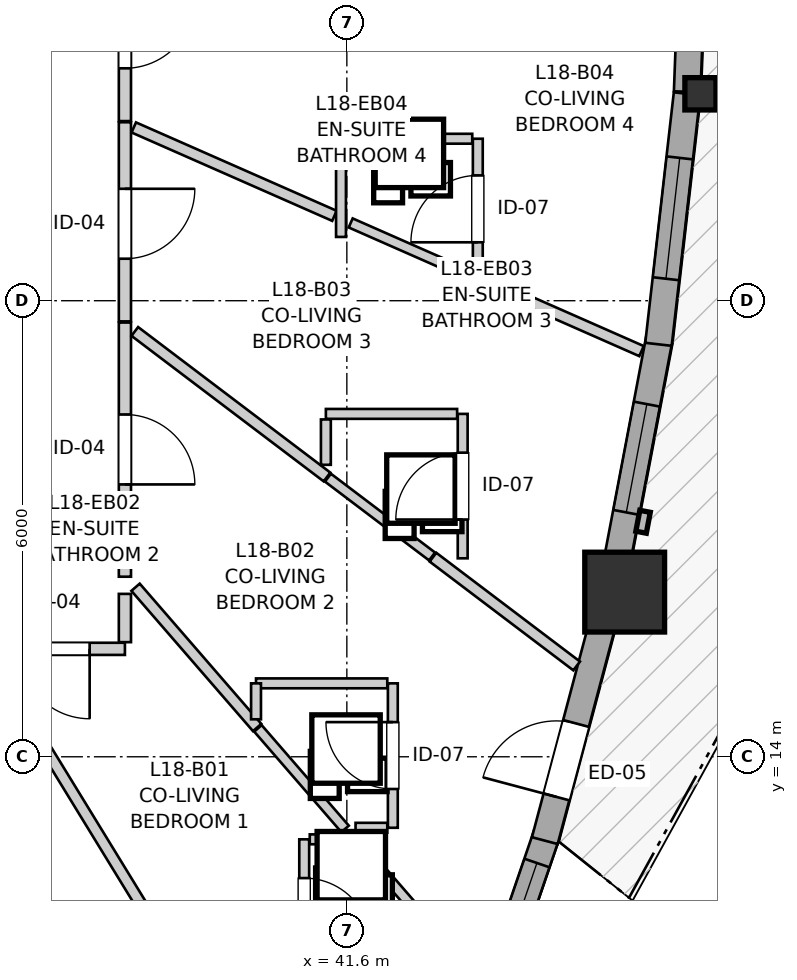
"""IFC4 building model, lengths in metres.
Left out: names, types, materials, properties, quantities, classifications, styles, units other than length and angle.
Written with IfcOpenShell. Run it as: python <this file> out.ifc"""

import sys

from ifc_helpers import new_model, si_unit, direction, frame, frame_2d, origin, origin_2d, place, context, subcontext, project, spatial, rectangle, i_section, extrude, source, transform, mapped, element, fill, save


model = new_model("IFC4")
c1 = context("Model", 3, precision=1e-05, world=origin(), true_north=direction((0.0, 1.0)))
c2 = subcontext(c1, "Body", "Model", "MODEL_VIEW")
j1 = project(units=[si_unit("LENGTHUNIT", "METRE"), si_unit("PLANEANGLEUNIT", "RADIAN")], contexts=[c1])
p1 = place(None, origin())
s1 = spatial("IfcSite", under=j1, at=p1, CompositionType="ELEMENT")
p2 = place(p1, origin())
s2 = spatial("IfcBuilding", under=s1, at=p2, CompositionType="ELEMENT")
p3 = place(p2, frame((0.0, 0.0, 62.2)))
s3 = spatial("IfcBuildingStorey", under=s2, at=p3, CompositionType="ELEMENT", Elevation=62.2)
m1 = source(origin(), c2, "Body", "SweptSolid", [
    extrude(rectangle(XDim=1.05, YDim=1.05, at=origin_2d()), origin(), (0.0, 0.0, 1.0), 2.9),
])
p4 = place(p3, frame((45.256, 16.166, 0.0), z_axis=(0.0, 0.0, 1.0), x_axis=(1.0, 0.0, 0.0)))
e1 = element("IfcColumn", 1, at=p4, inside=s3, PredefinedType="COLUMN", context=c2, shape_type="MappedRepresentation", body=[
    mapped(m1, transform((0.0, 0.0, 0.0), x_axis=(1.0, 0.0, 0.0), y_axis=(0.0, 1.0, 0.0), z_axis=(0.0, 0.0, 1.0), scale=1.0)),
])
m2 = source(origin(), c2, "Body", "SweptSolid", [
    extrude(i_section(OverallWidth=0.409, OverallDepth=0.425, WebThickness=0.03, FlangeThickness=0.048, FilletRadius=0.015, at=origin_2d()), origin(), (0.0, 0.0, 1.0), 2.9),
])
p5 = place(p3, frame((46.252, 22.722, 0.0), z_axis=(0.0, 0.0, 1.0), x_axis=(1.0, 0.0, 0.0)))
e2 = element("IfcColumn", 2, at=p5, inside=s3, PredefinedType="PILASTER", context=c2, shape_type="MappedRepresentation", body=[
    mapped(m2, transform((0.0, 0.0, 0.0), x_axis=(1.0, 0.0, 0.0), y_axis=(0.0, 1.0, 0.0), z_axis=(0.0, 0.0, 1.0), scale=1.0)),
])
p6 = place(p3, frame((43.104, 9.686, 0.0), z_axis=(0.0, 0.0, 1.0), x_axis=(0.323558843572, 0.946208050455, 0.0)))
e3 = element("IfcWall", 3, at=p6, inside=s3, PredefinedType="SOLIDWALL", context=c2, shape_type="SweptSolid", body=[
    extrude(rectangle(XDim=3.482, YDim=0.35, at=frame_2d((1.741, 0.0))), origin(), (0.0, 0.0, 1.0), 2.38),
])
p7 = place(p6, frame((0.396, 0.0, 0.82)))
e4 = element("IfcOpeningElement", 4, at=p7, cuts=e3, PredefinedType="OPENING", context=c2, shape_type="SweptSolid", body=[
    extrude(rectangle(XDim=0.58, YDim=1.35, at=frame_2d((0.29, 0.675))), frame((0.0, 0.185, 0.0), z_axis=(0.0, -1.0, 0.0), x_axis=(1.0, 0.0, 0.0)), (0.0, 0.0, 1.0), 0.37),
])
p8 = place(p6, frame((1.632, 0.0, 0.82)))
e5 = element("IfcOpeningElement", 5, at=p8, cuts=e3, PredefinedType="OPENING", context=c2, shape_type="SweptSolid", body=[
    extrude(rectangle(XDim=1.45, YDim=1.25, at=frame_2d((0.725, 0.625))), frame((0.0, 0.185, 0.0), z_axis=(0.0, -1.0, 0.0), x_axis=(1.0, 0.0, 0.0)), (0.0, 0.0, 1.0), 0.37),
])
p9 = place(p3, frame((44.205, 12.897, 0.0), z_axis=(0.0, 0.0, 1.0), x_axis=(0.257099428233, 0.966384956424, 0.0)))
e6 = element("IfcWall", 6, at=p9, inside=s3, PredefinedType="SOLIDWALL", context=c2, shape_type="SweptSolid", body=[
    extrude(rectangle(XDim=3.13, YDim=0.35, at=frame_2d((1.565, 0.0))), origin(), (0.0, 0.0, 1.0), 2.38),
])
p10 = place(p9, frame((0.595, 0.0, 0.0)))
e7 = element("IfcOpeningElement", 7, at=p10, cuts=e6, PredefinedType="OPENING", context=c2, shape_type="SweptSolid", body=[
    extrude(rectangle(XDim=1.0, YDim=2.1, at=frame_2d((0.5, 1.05))), frame((0.0, 0.185, 0.0), z_axis=(0.0, -1.0, 0.0), x_axis=(1.0, 0.0, 0.0)), (0.0, 0.0, 1.0), 0.37),
])
p11 = place(p3, frame((45.14, 16.494, 0.0), z_axis=(0.0, 0.0, 1.0), x_axis=(0.186608529586, 0.982434352354, 0.0)))
e8 = element("IfcWall", 8, at=p11, inside=s3, PredefinedType="SOLIDWALL", context=c2, shape_type="SweptSolid", body=[
    extrude(rectangle(XDim=3.074, YDim=0.35, at=frame_2d((1.537, 0.0))), origin(), (0.0, 0.0, 1.0), 2.38),
])
p12 = place(p11, frame((0.734, 0.0, 0.82)))
e9 = element("IfcOpeningElement", 9, at=p12, cuts=e8, PredefinedType="OPENING", context=c2, shape_type="SweptSolid", body=[
    extrude(rectangle(XDim=1.45, YDim=1.25, at=frame_2d((0.725, 0.625))), frame((0.0, 0.185, 0.0), z_axis=(0.0, -1.0, 0.0), x_axis=(1.0, 0.0, 0.0)), (0.0, 0.0, 1.0), 0.37),
])
p13 = place(p3, frame((45.7, 19.426, 0.0), z_axis=(0.0, 0.0, 1.0), x_axis=(0.113266370988, 0.993564657787, 0.0)))
e10 = element("IfcWall", 10, at=p13, inside=s3, PredefinedType="SOLIDWALL", context=c2, shape_type="SweptSolid", body=[
    extrude(rectangle(XDim=3.317, YDim=0.35, at=frame_2d((1.659, 0.0))), origin(), (0.0, 0.0, 1.0), 2.38),
])
p14 = place(p13, frame((0.869, 0.0, 0.82)))
e11 = element("IfcOpeningElement", 11, at=p14, cuts=e10, PredefinedType="OPENING", context=c2, shape_type="SweptSolid", body=[
    extrude(rectangle(XDim=1.6, YDim=1.35, at=frame_2d((0.8, 0.675))), frame((0.0, 0.185, 0.0), z_axis=(0.0, -1.0, 0.0), x_axis=(1.0, 0.0, 0.0)), (0.0, 0.0, 1.0), 0.37),
])
p15 = place(p3, frame((46.078, 22.749, 0.0), z_axis=(0.0, 0.0, 1.0), x_axis=(0.037972593677, 0.999278780986, 0.0)))
e12 = element("IfcWall", 12, at=p15, inside=s3, PredefinedType="SOLIDWALL", context=c2, shape_type="SweptSolid", body=[
    extrude(rectangle(XDim=3.298, YDim=0.35, at=frame_2d((1.649, 0.0))), origin(), (0.0, 0.0, 1.0), 2.38),
])
p16 = place(p15, frame((1.394, 0.0, 0.82)))
e13 = element("IfcOpeningElement", 13, at=p16, cuts=e12, PredefinedType="OPENING", context=c2, shape_type="SweptSolid", body=[
    extrude(rectangle(XDim=1.25, YDim=1.35, at=frame_2d((0.625, 0.675))), frame((0.0, 0.185, 0.0), z_axis=(0.0, -1.0, 0.0), x_axis=(1.0, 0.0, 0.0)), (0.0, 0.0, 1.0), 0.37),
])
p17 = place(p3, frame((38.68, 19.713, 0.0), z_axis=(0.0, 0.0, 1.0), x_axis=(0.0, -1.0, 0.0)))
e14 = element("IfcWall", 14, at=p17, inside=s3, PredefinedType="PARTITIONING", context=c2, shape_type="SweptSolid", body=[
    extrude(rectangle(XDim=3.344, YDim=0.16, at=frame_2d((1.672, 0.0))), origin(), (0.0, 0.0, 1.0), 2.9),
])
p18 = place(p17, frame((1.21, 0.0, 0.0)))
e15 = element("IfcOpeningElement", 15, at=p18, cuts=e14, PredefinedType="OPENING", context=c2, shape_type="SweptSolid", body=[
    extrude(rectangle(XDim=0.92, YDim=2.1, at=frame_2d((0.46, 1.05))), frame((0.0, 0.09, 0.0), z_axis=(0.0, -1.0, 0.0), x_axis=(1.0, 0.0, 0.0)), (0.0, 0.0, 1.0), 0.18),
])
p19 = place(p3, frame((38.68, 22.348, 0.0), z_axis=(0.0, 0.0, 1.0), x_axis=(0.0, -1.0, 0.0)))
e16 = element("IfcWall", 16, at=p19, inside=s3, PredefinedType="PARTITIONING", context=c2, shape_type="SweptSolid", body=[
    extrude(rectangle(XDim=2.62, YDim=0.16, at=frame_2d((1.31, 0.0))), origin(), (0.0, 0.0, 1.0), 2.9),
])
p20 = place(p19, frame((0.875, 0.0, 0.0)))
e17 = element("IfcOpeningElement", 17, at=p20, cuts=e16, PredefinedType="OPENING", context=c2, shape_type="SweptSolid", body=[
    extrude(rectangle(XDim=0.92, YDim=2.1, at=frame_2d((0.46, 1.05))), frame((0.0, 0.09, 0.0), z_axis=(0.0, -1.0, 0.0), x_axis=(1.0, 0.0, 0.0)), (0.0, 0.0, 1.0), 0.18),
])
p21 = place(p3, frame((38.68, 24.72, 0.0), z_axis=(0.0, 0.0, 1.0), x_axis=(0.0, -1.0, 0.0)))
e18 = element("IfcWall", 18, at=p21, inside=s3, PredefinedType="PARTITIONING", context=c2, shape_type="SweptSolid", body=[
    extrude(rectangle(XDim=2.357, YDim=0.16, at=frame_2d((1.178, 0.0))), origin(), (0.0, 0.0, 1.0), 2.9),
])
p22 = place(p21, frame((0.742, 0.0, 0.0)))
e19 = element("IfcOpeningElement", 19, at=p22, cuts=e18, PredefinedType="OPENING", context=c2, shape_type="SweptSolid", body=[
    extrude(rectangle(XDim=0.92, YDim=2.1, at=frame_2d((0.46, 1.05))), frame((0.0, 0.09, 0.0), z_axis=(0.0, -1.0, 0.0), x_axis=(1.0, 0.0, 0.0)), (0.0, 0.0, 1.0), 0.18),
])
p23 = place(p3, frame((41.039, 12.914, 0.0), z_axis=(0.0, 0.0, 1.0), x_axis=(0.0, -1.0, 0.0)))
e20 = element("IfcWall", 20, at=p23, inside=s3, PredefinedType="PARTITIONING", context=c2, shape_type="SweptSolid", body=[
    extrude(rectangle(XDim=1.9, YDim=0.13, at=frame_2d((0.95, 0.0))), origin(), (0.0, 0.0, 1.0), 2.9),
])
p24 = place(p23, frame((0.51, 0.0, 0.0)))
e21 = element("IfcOpeningElement", 21, at=p24, cuts=e20, PredefinedType="OPENING", context=c2, shape_type="SweptSolid", body=[
    extrude(rectangle(XDim=0.88, YDim=2.05, at=frame_2d((0.44, 1.025))), frame((0.0, 0.075, 0.0), z_axis=(0.0, -1.0, 0.0), x_axis=(1.0, 0.0, 0.0)), (0.0, 0.0, 1.0), 0.15),
])
p25 = place(p3, frame((42.205, 13.066, 0.0), z_axis=(0.0, 0.0, 1.0), x_axis=(0.0, 1.0, 0.0)))
e22 = element("IfcWall", 22, at=p25, inside=s3, PredefinedType="PARTITIONING", context=c2, shape_type="SweptSolid", body=[
    extrude(rectangle(XDim=1.9, YDim=0.13, at=frame_2d((0.95, 0.0))), origin(), (0.0, 0.0, 1.0), 2.9),
])
p26 = place(p25, frame((0.51, 0.0, 0.0)))
e23 = element("IfcOpeningElement", 23, at=p26, cuts=e22, PredefinedType="OPENING", context=c2, shape_type="SweptSolid", body=[
    extrude(rectangle(XDim=0.88, YDim=2.05, at=frame_2d((0.44, 1.025))), frame((0.0, 0.075, 0.0), z_axis=(0.0, -1.0, 0.0), x_axis=(1.0, 0.0, 0.0)), (0.0, 0.0, 1.0), 0.15),
])
p27 = place(p3, frame((43.124, 16.611, 0.0), z_axis=(0.0, 0.0, 1.0), x_axis=(0.0, 1.0, 0.0)))
e24 = element("IfcWall", 24, at=p27, inside=s3, PredefinedType="PARTITIONING", context=c2, shape_type="SweptSolid", body=[
    extrude(rectangle(XDim=1.9, YDim=0.13, at=frame_2d((0.95, 0.0))), origin(), (0.0, 0.0, 1.0), 2.9),
])
p28 = place(p27, frame((0.51, 0.0, 0.0)))
e25 = element("IfcOpeningElement", 25, at=p28, cuts=e24, PredefinedType="OPENING", context=c2, shape_type="SweptSolid", body=[
    extrude(rectangle(XDim=0.88, YDim=2.05, at=frame_2d((0.44, 1.025))), frame((0.0, 0.075, 0.0), z_axis=(0.0, -1.0, 0.0), x_axis=(1.0, 0.0, 0.0)), (0.0, 0.0, 1.0), 0.15),
])
p29 = place(p3, frame((43.323, 20.286, 0.0), z_axis=(0.0, 0.0, 1.0), x_axis=(0.0, 1.0, 0.0)))
e26 = element("IfcWall", 26, at=p29, inside=s3, PredefinedType="PARTITIONING", context=c2, shape_type="SweptSolid", body=[
    extrude(rectangle(XDim=1.845, YDim=0.13, at=frame_2d((0.923, 0.0))), origin(), (0.0, 0.0, 1.0), 2.9),
])
p30 = place(p29, frame((0.482, 0.0, 0.0)))
e27 = element("IfcOpeningElement", 27, at=p30, cuts=e26, PredefinedType="OPENING", context=c2, shape_type="SweptSolid", body=[
    extrude(rectangle(XDim=0.88, YDim=2.05, at=frame_2d((0.44, 1.025))), frame((0.0, 0.075, 0.0), z_axis=(0.0, -1.0, 0.0), x_axis=(1.0, 0.0, 0.0)), (0.0, 0.0, 1.0), 0.15),
])
p31 = place(p3, frame((38.68, 15.42, 0.0), z_axis=(0.0, 0.0, 1.0), x_axis=(-1.0, 0.0, 0.0)))
e28 = element("IfcWall", 28, at=p31, inside=s3, PredefinedType="PARTITIONING", context=c2, shape_type="SweptSolid", body=[
    extrude(rectangle(XDim=1.816, YDim=0.16, at=frame_2d((0.908, 0.0))), origin(), (0.0, 0.0, 1.0), 2.9),
])
p32 = place(p31, frame((0.464, 0.0, 0.0)))
e29 = element("IfcOpeningElement", 29, at=p32, cuts=e28, PredefinedType="OPENING", context=c2, shape_type="SweptSolid", body=[
    extrude(rectangle(XDim=0.92, YDim=2.1, at=frame_2d((0.46, 1.05))), frame((0.0, 0.09, 0.0), z_axis=(0.0, -1.0, 0.0), x_axis=(1.0, 0.0, 0.0)), (0.0, 0.0, 1.0), 0.18),
])
p33 = place(p3, frame((36.908, 15.295, 0.0), z_axis=(0.0, 0.0, 1.0), x_axis=(0.522407183079, -0.852696156358, 0.0)))
e30 = element("IfcWall", 30, at=p33, inside=s3, PredefinedType="PARTITIONING", context=c2, shape_type="SweptSolid", body=[
    extrude(rectangle(XDim=9.87, YDim=0.145, at=frame_2d((4.935, 0.0))), origin(), (0.0, 0.0, 1.0), 2.9),
])
p34 = place(p3, frame((38.81, 19.595, 0.0), z_axis=(0.0, 0.0, 1.0), x_axis=(0.797304275437, -0.603577577756, 0.0)))
e31 = element("IfcWall", 31, at=p34, inside=s3, PredefinedType="PARTITIONING", context=c2, shape_type="SweptSolid", body=[
    extrude(rectangle(XDim=3.172, YDim=0.145, at=frame_2d((1.586, 0.0))), origin(), (0.0, 0.0, 1.0), 2.9),
])
p35 = place(p3, frame((38.796, 22.28, 0.0), z_axis=(0.0, 0.0, 1.0), x_axis=(0.9151327572, -0.403152622092, 0.0)))
e32 = element("IfcWall", 32, at=p35, inside=s3, PredefinedType="PARTITIONING", context=c2, shape_type="SweptSolid", body=[
    extrude(rectangle(XDim=2.885, YDim=0.145, at=frame_2d((1.442, 0.0))), origin(), (0.0, 0.0, 1.0), 2.9),
])
p36 = place(p3, frame((38.82, 16.23, 0.0), z_axis=(0.0, 0.0, 1.0), x_axis=(0.655037088123, -0.755596726556, 0.0)))
e33 = element("IfcWall", 33, at=p36, inside=s3, PredefinedType="PARTITIONING", context=c2, shape_type="SweptSolid", body=[
    extrude(rectangle(XDim=2.442, YDim=0.145, at=frame_2d((1.221, 0.0))), origin(), (0.0, 0.0, 1.0), 2.9),
])
p37 = place(p3, frame((43.41, 20.248, 0.0), z_axis=(0.0, 0.0, 1.0), x_axis=(0.915032786041, -0.403379474527, 0.0)))
e34 = element("IfcWall", 34, at=p37, inside=s3, PredefinedType="PARTITIONING", context=c2, shape_type="SweptSolid", body=[
    extrude(rectangle(XDim=2.259, YDim=0.145, at=frame_2d((1.13, 0.0))), origin(), (0.0, 0.0, 1.0), 2.9),
])
p38 = place(p3, frame((42.733, 16.626, 0.0), z_axis=(0.0, 0.0, 1.0), x_axis=(0.797372907097, -0.603486907089, 0.0)))
e35 = element("IfcWall", 35, at=p38, inside=s3, PredefinedType="PARTITIONING", context=c2, shape_type="SweptSolid", body=[
    extrude(rectangle(XDim=2.371, YDim=0.145, at=frame_2d((1.186, 0.0))), origin(), (0.0, 0.0, 1.0), 2.9),
])
p39 = place(p3, frame((41.65, 21.023, 0.0), z_axis=(0.0, 0.0, 1.0), x_axis=(0.915165742406, -0.403077739309, 0.0)))
e36 = element("IfcWall", 36, at=p39, inside=s3, PredefinedType="PARTITIONING", context=c2, shape_type="SweptSolid", body=[
    extrude(rectangle(XDim=1.689, YDim=0.13, at=frame_2d((0.844, 0.0))), origin(), (0.0, 0.0, 1.0), 2.9),
])
for number, where, z_axis, x_axis in (
    (37, (41.324, 18.511, 0.0), (0.0, 0.0, 1.0), (1.0, 0.0, 0.0)),
    (38, (40.405, 14.966, 0.0), (0.0, 0.0, 1.0), (1.0, 0.0, 0.0)),
):
    element("IfcWall", number, at=place(p3, frame(where, z_axis=z_axis, x_axis=x_axis)), inside=s3, PredefinedType="PARTITIONING", context=c2, shape_type="SweptSolid", body=[
        extrude(rectangle(XDim=1.727, YDim=0.13, at=frame_2d((0.864, 0.0))), origin(), (0.0, 0.0, 1.0), 2.9),
    ])
p40 = place(p3, frame((41.596, 22.131, 0.0), z_axis=(0.0, 0.0, 1.0), x_axis=(1.0, 0.0, 0.0)))
e39 = element("IfcWall", 39, at=p40, inside=s3, PredefinedType="PARTITIONING", context=c2, shape_type="SweptSolid", body=[
    extrude(rectangle(XDim=1.654, YDim=0.13, at=frame_2d((0.827, 0.0))), origin(), (0.0, 0.0, 1.0), 2.9),
])
p41 = place(p3, frame((40.43, 14.374, 0.0), z_axis=(0.0, 0.0, 1.0), x_axis=(0.655121637619, -0.755523421162, 0.0)))
e40 = element("IfcWall", 40, at=p41, inside=s3, PredefinedType="PARTITIONING", context=c2, shape_type="SweptSolid", body=[
    extrude(rectangle(XDim=1.751, YDim=0.13, at=frame_2d((0.875, 0.0))), origin(), (0.0, 0.0, 1.0), 2.9),
])
p42 = place(p3, frame((41.696, 12.914, 0.0), z_axis=(0.0, 0.0, 1.0), x_axis=(0.654882611276, -0.755730616985, 0.0)))
e41 = element("IfcWall", 41, at=p42, inside=s3, PredefinedType="PARTITIONING", context=c2, shape_type="SweptSolid", body=[
    extrude(rectangle(XDim=1.745, YDim=0.13, at=frame_2d((0.873, 0.0))), origin(), (0.0, 0.0, 1.0), 2.9),
])
p43 = place(p3, frame((41.351, 17.672, 0.0), z_axis=(0.0, 0.0, 1.0), x_axis=(0.797400841938, -0.603449995672, 0.0)))
e42 = element("IfcWall", 42, at=p43, inside=s3, PredefinedType="PARTITIONING", context=c2, shape_type="SweptSolid", body=[
    extrude(rectangle(XDim=1.718, YDim=0.13, at=frame_2d((0.859, 0.0))), origin(), (0.0, 0.0, 1.0), 2.9),
])
p44 = place(p3, frame((41.523, 20.839, 0.0), z_axis=(0.0, 0.0, 1.0), x_axis=(0.0, 1.0, 0.0)))
e43 = element("IfcWall", 43, at=p44, inside=s3, PredefinedType="PARTITIONING", context=c2, shape_type="SweptSolid", body=[
    extrude(rectangle(XDim=1.532, YDim=0.13, at=frame_2d((0.766, 0.0))), origin(), (0.0, 0.0, 1.0), 2.9),
])
p45 = place(p3, frame((38.68, 15.508, 0.0), z_axis=(0.0, 0.0, 1.0), x_axis=(0.0, 1.0, 0.0)))
e44 = element("IfcWall", 44, at=p45, inside=s3, PredefinedType="PARTITIONING", context=c2, shape_type="SweptSolid", body=[
    extrude(rectangle(XDim=0.635, YDim=0.16, at=frame_2d((0.317, 0.0))), origin(), (0.0, 0.0, 1.0), 2.9),
])
p46 = place(p3, frame((41.324, 17.841, 0.0), z_axis=(0.0, 0.0, 1.0), x_axis=(0.0, 1.0, 0.0)))
e45 = element("IfcWall", 45, at=p46, inside=s3, PredefinedType="PARTITIONING", context=c2, shape_type="SweptSolid", body=[
    extrude(rectangle(XDim=0.597, YDim=0.13, at=frame_2d((0.298, 0.0))), origin(), (0.0, 0.0, 1.0), 2.9),
])
p47 = place(p3, frame((41.112, 12.914, 0.0), z_axis=(0.0, 0.0, 1.0), x_axis=(1.0, 0.0, 0.0)))
e46 = element("IfcWall", 46, at=p47, inside=s3, PredefinedType="PARTITIONING", context=c2, shape_type="SweptSolid", body=[
    extrude(rectangle(XDim=0.434, YDim=0.13, at=frame_2d((0.217, 0.0))), origin(), (0.0, 0.0, 1.0), 2.9),
])
p48 = place(p3, frame((41.714, 13.066, 0.0), z_axis=(0.0, 0.0, 1.0), x_axis=(1.0, 0.0, 0.0)))
e47 = element("IfcWall", 47, at=p48, inside=s3, PredefinedType="PARTITIONING", context=c2, shape_type="SweptSolid", body=[
    extrude(rectangle(XDim=0.418, YDim=0.13, at=frame_2d((0.209, 0.0))), origin(), (0.0, 0.0, 1.0), 2.9),
])
p49 = place(p3, frame((40.405, 14.493, 0.0), z_axis=(0.0, 0.0, 1.0), x_axis=(0.0, 1.0, 0.0)))
e48 = element("IfcWall", 48, at=p49, inside=s3, PredefinedType="PARTITIONING", context=c2, shape_type="SweptSolid", body=[
    extrude(rectangle(XDim=0.473, YDim=0.13, at=frame_2d((0.237, 0.0))), origin(), (0.0, 0.0, 1.0), 2.9),
])
m3 = source(origin(), c2, "Body", "SweptSolid", [
    extrude(rectangle(XDim=1.45, YDim=1.25, at=frame_2d((0.725, 0.625))), frame((0.0, 0.03, 0.0), z_axis=(0.0, -1.0, 0.0), x_axis=(1.0, 0.0, 0.0)), (0.0, 0.0, 1.0), 0.06),
])
p50 = place(p8, origin())
e49 = element("IfcWindow", 49, at=p50, inside=s3, PartitioningType="SINGLE_PANEL", PredefinedType="WINDOW", context=c2, shape_type="MappedRepresentation", body=[
    mapped(m3, transform((0.0, 0.0, 0.0), x_axis=(1.0, 0.0, 0.0), y_axis=(0.0, 1.0, 0.0), z_axis=(0.0, 0.0, 1.0), scale=1.0)),
])
fill(e5, e49)
p51 = place(p12, origin())
e50 = element("IfcWindow", 50, at=p51, inside=s3, PartitioningType="SINGLE_PANEL", PredefinedType="WINDOW", context=c2, shape_type="MappedRepresentation", body=[
    mapped(m3, transform((0.0, 0.0, 0.0), x_axis=(1.0, 0.0, 0.0), y_axis=(0.0, 1.0, 0.0), z_axis=(0.0, 0.0, 1.0), scale=1.0)),
])
fill(e9, e50)
m4 = source(origin(), c2, "Body", "SweptSolid", [
    extrude(rectangle(XDim=1.6, YDim=1.35, at=frame_2d((0.8, 0.675))), frame((0.0, 0.03, 0.0), z_axis=(0.0, -1.0, 0.0), x_axis=(1.0, 0.0, 0.0)), (0.0, 0.0, 1.0), 0.06),
])
p52 = place(p14, origin())
e51 = element("IfcWindow", 51, at=p52, inside=s3, PartitioningType="SINGLE_PANEL", PredefinedType="WINDOW", context=c2, shape_type="MappedRepresentation", body=[
    mapped(m4, transform((0.0, 0.0, 0.0), x_axis=(1.0, 0.0, 0.0), y_axis=(0.0, 1.0, 0.0), z_axis=(0.0, 0.0, 1.0), scale=1.0)),
])
fill(e11, e51)
m5 = source(origin(), c2, "Body", "SweptSolid", [
    extrude(rectangle(XDim=1.0, YDim=2.1, at=frame_2d((0.5, 1.05))), frame((0.0, 0.025, 0.0), z_axis=(0.0, -1.0, 0.0), x_axis=(1.0, 0.0, 0.0)), (0.0, 0.0, 1.0), 0.05),
])
p53 = place(p10, origin())
e52 = element("IfcDoor", 52, at=p53, inside=s3, OperationType="SINGLE_SWING_LEFT", PredefinedType="DOOR", context=c2, shape_type="MappedRepresentation", body=[
    mapped(m5, transform((0.0, 0.0, 0.0), x_axis=(1.0, 0.0, 0.0), y_axis=(0.0, 1.0, 0.0), z_axis=(0.0, 0.0, 1.0), scale=1.0)),
])
fill(e7, e52)
m6 = source(origin(), c2, "Body", "SweptSolid", [
    extrude(rectangle(XDim=0.92, YDim=2.1, at=frame_2d((0.46, 1.05))), frame((0.0, 0.025, 0.0), z_axis=(0.0, -1.0, 0.0), x_axis=(1.0, 0.0, 0.0)), (0.0, 0.0, 1.0), 0.05),
])
p54 = place(p18, origin())
e53 = element("IfcDoor", 53, at=p54, inside=s3, OperationType="SINGLE_SWING_RIGHT", PredefinedType="DOOR", context=c2, shape_type="MappedRepresentation", body=[
    mapped(m6, transform((0.0, 0.0, 0.0), x_axis=(1.0, 0.0, 0.0), y_axis=(0.0, 1.0, 0.0), z_axis=(0.0, 0.0, 1.0), scale=1.0)),
])
fill(e15, e53)
p55 = place(p20, origin())
e54 = element("IfcDoor", 54, at=p55, inside=s3, OperationType="SINGLE_SWING_LEFT", PredefinedType="DOOR", context=c2, shape_type="MappedRepresentation", body=[
    mapped(m6, transform((0.0, 0.0, 0.0), x_axis=(1.0, 0.0, 0.0), y_axis=(0.0, 1.0, 0.0), z_axis=(0.0, 0.0, 1.0), scale=1.0)),
])
fill(e17, e54)
p56 = place(p22, origin())
e55 = element("IfcDoor", 55, at=p56, inside=s3, OperationType="SINGLE_SWING_LEFT", PredefinedType="DOOR", context=c2, shape_type="MappedRepresentation", body=[
    mapped(m6, transform((0.0, 0.0, 0.0), x_axis=(1.0, 0.0, 0.0), y_axis=(0.0, 1.0, 0.0), z_axis=(0.0, 0.0, 1.0), scale=1.0)),
])
fill(e19, e55)
m7 = source(origin(), c2, "Body", "SweptSolid", [
    extrude(rectangle(XDim=0.88, YDim=2.05, at=frame_2d((0.44, 1.025))), frame((0.0, 0.025, 0.0), z_axis=(0.0, -1.0, 0.0), x_axis=(1.0, 0.0, 0.0)), (0.0, 0.0, 1.0), 0.05),
])
p57 = place(p24, origin())
e56 = element("IfcDoor", 56, at=p57, inside=s3, OperationType="SINGLE_SWING_RIGHT", PredefinedType="DOOR", context=c2, shape_type="MappedRepresentation", body=[
    mapped(m7, transform((0.0, 0.0, 0.0), x_axis=(1.0, 0.0, 0.0), y_axis=(0.0, 1.0, 0.0), z_axis=(0.0, 0.0, 1.0), scale=1.0)),
])
fill(e21, e56)
p58 = place(p26, origin())
e57 = element("IfcDoor", 57, at=p58, inside=s3, OperationType="SINGLE_SWING_RIGHT", PredefinedType="DOOR", context=c2, shape_type="MappedRepresentation", body=[
    mapped(m7, transform((0.0, 0.0, 0.0), x_axis=(1.0, 0.0, 0.0), y_axis=(0.0, 1.0, 0.0), z_axis=(0.0, 0.0, 1.0), scale=1.0)),
])
fill(e23, e57)
p59 = place(p28, origin())
e58 = element("IfcDoor", 58, at=p59, inside=s3, OperationType="SINGLE_SWING_LEFT", PredefinedType="DOOR", context=c2, shape_type="MappedRepresentation", body=[
    mapped(m7, transform((0.0, 0.0, 0.0), x_axis=(1.0, 0.0, 0.0), y_axis=(0.0, 1.0, 0.0), z_axis=(0.0, 0.0, 1.0), scale=1.0)),
])
fill(e25, e58)
p60 = place(p30, origin())
e59 = element("IfcDoor", 59, at=p60, inside=s3, OperationType="SINGLE_SWING_LEFT", PredefinedType="DOOR", context=c2, shape_type="MappedRepresentation", body=[
    mapped(m7, transform((0.0, 0.0, 0.0), x_axis=(1.0, 0.0, 0.0), y_axis=(0.0, 1.0, 0.0), z_axis=(0.0, 0.0, 1.0), scale=1.0)),
])
fill(e27, e59)
p61 = place(p32, origin())
e60 = element("IfcDoor", 60, at=p61, inside=s3, OperationType="SINGLE_SWING_LEFT", PredefinedType="DOOR", context=c2, shape_type="MappedRepresentation", body=[
    mapped(m6, transform((0.0, 0.0, 0.0), x_axis=(1.0, 0.0, 0.0), y_axis=(0.0, 1.0, 0.0), z_axis=(0.0, 0.0, 1.0), scale=1.0)),
])
fill(e29, e60)
save(model, sys.argv[1])
